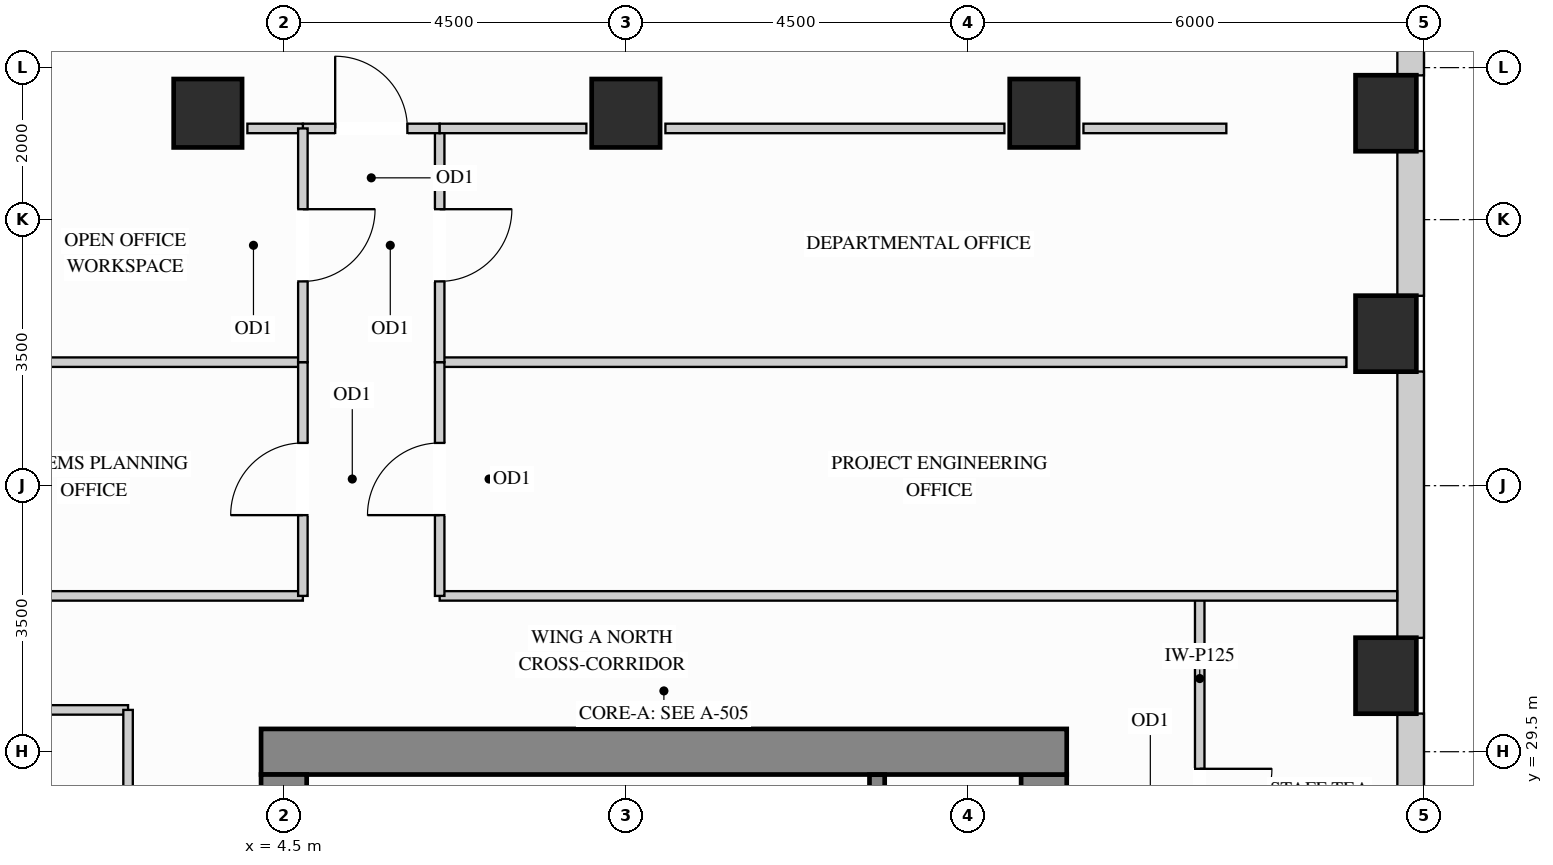
"""IFC4 building model, lengths in metres.
Left out: names, types, materials, properties, quantities, classifications, styles, units other than length and angle.
Written with IfcOpenShell. Run it as: python <this file> out.ifc"""

import sys

from ifc_helpers import new_model, si_unit, direction, frame, frame_2d, origin, origin_2d, place, context, subcontext, project, spatial, rectangle, extrude, source, transform, mapped, element, fill, save


model = new_model("IFC4")
c1 = context("Model", 3, precision=1e-05, world=origin(), true_north=direction((0.0, 1.0)))
c2 = subcontext(c1, "Body", "Model", "MODEL_VIEW")
j1 = project(units=[si_unit("LENGTHUNIT", "METRE"), si_unit("PLANEANGLEUNIT", "RADIAN")], contexts=[c1])
p1 = place(None, origin())
s1 = spatial("IfcSite", under=j1, at=p1, CompositionType="ELEMENT")
p2 = place(p1, origin())
s2 = spatial("IfcBuilding", under=s1, at=p2, CompositionType="ELEMENT")
p3 = place(p2, frame((0.0, 0.0, 189.9)))
s3 = spatial("IfcBuildingStorey", under=s2, at=p3, CompositionType="ELEMENT", Elevation=189.9)
m1 = source(origin(), c2, "Body", "SweptSolid", [
    extrude(rectangle(XDim=0.9, YDim=0.9, at=origin_2d()), origin(), (0.0, 0.0, 1.0), 3.4),
])
for number, where, z_axis, x_axis in (
    (1, (14.5, 37.9, 0.0), (0.0, 0.0, 1.0), (1.0, 0.0, 0.0)),
    (2, (3.5, 37.9, 0.0), (0.0, 0.0, 1.0), (1.0, 0.0, 0.0)),
    (3, (9.0, 37.9, 0.0), (0.0, 0.0, 1.0), (1.0, 0.0, 0.0)),
):
    element("IfcColumn", number, at=place(p3, frame(where, z_axis=z_axis, x_axis=x_axis)), inside=s3, PredefinedType="COLUMN", context=c2, shape_type="MappedRepresentation", body=[
        mapped(m1, transform((0.0, 0.0, 0.0), x_axis=(1.0, 0.0, 0.0), y_axis=(0.0, 1.0, 0.0), z_axis=(0.0, 0.0, 1.0))),
    ])
m2 = source(origin(), c2, "Body", "SweptSolid", [
    extrude(rectangle(XDim=0.8, YDim=1.0, at=origin_2d()), origin(), (0.0, 0.0, 1.0), 3.4),
])
for number, where, z_axis, x_axis in (
    (4, (19.0, 30.5, 0.0), (0.0, 0.0, 1.0), (1.0, 0.0, 0.0)),
    (5, (19.0, 35.0, 0.0), (0.0, 0.0, 1.0), (1.0, 0.0, 0.0)),
    (6, (19.0, 37.9, 0.0), (0.0, 0.0, 1.0), (1.0, 0.0, 0.0)),
):
    element("IfcColumn", number, at=place(p3, frame(where, z_axis=z_axis, x_axis=x_axis)), inside=s3, PredefinedType="COLUMN", context=c2, shape_type="MappedRepresentation", body=[
        mapped(m2, transform((0.0, 0.0, 0.0), x_axis=(1.0, 0.0, 0.0), y_axis=(0.0, 1.0, 0.0), z_axis=(0.0, 0.0, 1.0))),
    ])
m3 = source(origin(), c2, "Body", "SweptSolid", [
    extrude(rectangle(XDim=8.32, YDim=0.6, at=frame_2d((4.16, 0.0))), origin(), (0.0, 0.0, 1.0), 3.4),
])
p4 = place(p3, frame((14.5, 20.88, 0.0), z_axis=(0.0, 0.0, 1.0), x_axis=(0.0, 1.0, 0.0)))
e7 = element("IfcWall", 7, at=p4, inside=s3, PredefinedType="SHEAR", context=c2, shape_type="MappedRepresentation", body=[
    mapped(m3, transform((0.0, 0.0, 0.0), x_axis=(1.0, 0.0, 0.0), y_axis=(0.0, 1.0, 0.0), z_axis=(0.0, 0.0, 1.0))),
])
m4 = source(origin(), c2, "Body", "SweptSolid", [
    extrude(rectangle(XDim=10.6, YDim=0.6, at=frame_2d((5.3, 0.0))), origin(), (0.0, 0.0, 1.0), 3.4),
])
p5 = place(p3, frame((4.2, 29.5, 0.0), z_axis=(0.0, 0.0, 1.0), x_axis=(1.0, 0.0, 0.0)))
e8 = element("IfcWall", 8, at=p5, inside=s3, PredefinedType="SHEAR", context=c2, shape_type="MappedRepresentation", body=[
    mapped(m4, transform((0.0, 0.0, 0.0), x_axis=(1.0, 0.0, 0.0), y_axis=(0.0, 1.0, 0.0), z_axis=(0.0, 0.0, 1.0))),
])
m5 = source(origin(), c2, "Body", "SweptSolid", [
    extrude(rectangle(XDim=20.4, YDim=0.6, at=frame_2d((10.2, 0.0))), origin(), (0.0, 0.0, 1.0), 3.4),
])
p6 = place(p3, frame((4.5, 8.8, 0.0), z_axis=(0.0, 0.0, 1.0), x_axis=(0.0, 1.0, 0.0)))
e9 = element("IfcWall", 9, at=p6, inside=s3, PredefinedType="SHEAR", context=c2, shape_type="MappedRepresentation", body=[
    mapped(m5, transform((0.0, 0.0, 0.0), x_axis=(1.0, 0.0, 0.0), y_axis=(0.0, 1.0, 0.0), z_axis=(0.0, 0.0, 1.0))),
])
p7 = place(p3, frame((19.325, 27.298, 0.0), z_axis=(0.0, 0.0, 1.0), x_axis=(0.0, 1.0, 0.0)))
e10 = element("IfcWall", 10, at=p7, inside=s3, PredefinedType="SOLIDWALL", context=c2, shape_type="SweptSolid", body=[
    extrude(rectangle(XDim=2.704, YDim=0.35, at=frame_2d((1.352, 0.0))), origin(), (0.0, 0.0, 1.0), 2.612),
])
p8 = place(p7, frame((0.524, 0.0, 0.78)))
e11 = element("IfcOpeningElement", 11, at=p8, cuts=e10, PredefinedType="OPENING", context=c2, shape_type="SweptSolid", body=[
    extrude(rectangle(XDim=1.2, YDim=1.652, at=frame_2d((0.6, 0.826))), frame((0.0, 0.185, 0.0), z_axis=(0.0, -1.0, 0.0), x_axis=(1.0, 0.0, 0.0)), (0.0, 0.0, 1.0), 0.37),
])
m6 = source(origin(), c2, "Body", "SweptSolid", [
    extrude(rectangle(XDim=3.504, YDim=0.35, at=frame_2d((1.752, 0.0))), origin(), (0.0, 0.0, 1.0), 2.612),
])
p9 = place(p3, frame((19.325, 30.998, 0.0), z_axis=(0.0, 0.0, 1.0), x_axis=(0.0, 1.0, 0.0)))
e12 = element("IfcWall", 12, at=p9, inside=s3, PredefinedType="SOLIDWALL", context=c2, shape_type="MappedRepresentation", body=[
    mapped(m6, transform((0.0, 0.0, 0.0), x_axis=(1.0, 0.0, 0.0), y_axis=(0.0, 1.0, 0.0), z_axis=(0.0, 0.0, 1.0))),
])
m7 = source(origin(), c2, "Body", "SweptSolid", [
    extrude(rectangle(XDim=1.904, YDim=0.35, at=frame_2d((0.952, 0.0))), origin(), (0.0, 0.0, 1.0), 2.612),
])
p10 = place(p3, frame((19.325, 35.498, 0.0), z_axis=(0.0, 0.0, 1.0), x_axis=(0.0, 1.0, 0.0)))
e13 = element("IfcWall", 13, at=p10, inside=s3, PredefinedType="SOLIDWALL", context=c2, shape_type="MappedRepresentation", body=[
    mapped(m7, transform((0.0, 0.0, 0.0), x_axis=(1.0, 0.0, 0.0), y_axis=(0.0, 1.0, 0.0), z_axis=(0.0, 0.0, 1.0))),
])
m8 = source(origin(), c2, "Body", "SweptSolid", [
    extrude(rectangle(XDim=0.754, YDim=0.35, at=frame_2d((0.377, 0.0))), origin(), (0.0, 0.0, 1.0), 3.385),
])
p11 = place(p3, frame((19.325, 38.398, 0.0), z_axis=(0.0, 0.0, 1.0), x_axis=(0.0, 1.0, 0.0)))
e14 = element("IfcWall", 14, at=p11, inside=s3, PredefinedType="SOLIDWALL", context=c2, shape_type="MappedRepresentation", body=[
    mapped(m8, transform((0.0, 0.0, 0.0), x_axis=(1.0, 0.0, 0.0), y_axis=(0.0, 1.0, 0.0), z_axis=(0.0, 0.0, 1.0))),
])
p12 = place(p3, frame((16.55, 26.05, 0.0), z_axis=(0.0, 0.0, 1.0), x_axis=(0.0, 1.0, 0.0)))
e15 = element("IfcWall", 15, at=p12, inside=s3, PredefinedType="PARTITIONING", context=c2, shape_type="SweptSolid", body=[
    extrude(rectangle(XDim=5.5, YDim=0.125, at=frame_2d((2.75, 0.0))), origin(), (0.0, 0.0, 1.0), 3.385),
])
p13 = place(p12, frame((2.275, 0.0, 0.0)))
e16 = element("IfcOpeningElement", 16, at=p13, cuts=e15, PredefinedType="OPENING", context=c2, shape_type="SweptSolid", body=[
    extrude(rectangle(XDim=0.95, YDim=2.15, at=frame_2d((0.475, 1.075))), frame((0.0, 0.073, 0.0), z_axis=(0.0, -1.0, 0.0), x_axis=(1.0, 0.0, 0.0)), (0.0, 0.0, 1.0), 0.145),
])
m9 = source(origin(), c2, "Body", "SweptSolid", [
    extrude(rectangle(XDim=11.93, YDim=0.125, at=frame_2d((5.965, 0.0))), origin(), (0.0, 0.0, 1.0), 3.385),
])
p14 = place(p3, frame((6.55, 34.625, 0.0), z_axis=(0.0, 0.0, 1.0), x_axis=(1.0, 0.0, 0.0)))
e17 = element("IfcWall", 17, at=p14, inside=s3, PredefinedType="PARTITIONING", context=c2, shape_type="MappedRepresentation", body=[
    mapped(m9, transform((0.0, 0.0, 0.0), x_axis=(1.0, 0.0, 0.0), y_axis=(0.0, 1.0, 0.0), z_axis=(0.0, 0.0, 1.0))),
])
m10 = source(origin(), c2, "Body", "SweptSolid", [
    extrude(rectangle(XDim=12.598, YDim=0.125, at=frame_2d((6.299, 0.0))), origin(), (0.0, 0.0, 1.0), 3.385),
])
p15 = place(p3, frame((6.55, 31.55, 0.0), z_axis=(0.0, 0.0, 1.0), x_axis=(1.0, 0.0, 0.0)))
e18 = element("IfcWall", 18, at=p15, inside=s3, PredefinedType="PARTITIONING", context=c2, shape_type="MappedRepresentation", body=[
    mapped(m10, transform((0.0, 0.0, 0.0), x_axis=(1.0, 0.0, 0.0), y_axis=(0.0, 1.0, 0.0), z_axis=(0.0, 0.0, 1.0))),
])
m11 = source(origin(), c2, "Body", "SweptSolid", [
    extrude(rectangle(XDim=4.398, YDim=0.125, at=frame_2d((2.199, 0.0))), origin(), (0.0, 0.0, 1.0), 3.385),
])
p16 = place(p3, frame((0.352, 31.55, 0.0), z_axis=(0.0, 0.0, 1.0), x_axis=(1.0, 0.0, 0.0)))
e19 = element("IfcWall", 19, at=p16, inside=s3, PredefinedType="PARTITIONING", context=c2, shape_type="MappedRepresentation", body=[
    mapped(m11, transform((0.0, 0.0, 0.0), x_axis=(1.0, 0.0, 0.0), y_axis=(0.0, 1.0, 0.0), z_axis=(0.0, 0.0, 1.0))),
])
m12 = source(origin(), c2, "Body", "SweptSolid", [
    extrude(rectangle(XDim=3.63, YDim=0.125, at=frame_2d((1.815, 0.0))), origin(), (0.0, 0.0, 1.0), 3.385),
])
p17 = place(p3, frame((1.12, 34.625, 0.0), z_axis=(0.0, 0.0, 1.0), x_axis=(1.0, 0.0, 0.0)))
e20 = element("IfcWall", 20, at=p17, inside=s3, PredefinedType="PARTITIONING", context=c2, shape_type="MappedRepresentation", body=[
    mapped(m12, transform((0.0, 0.0, 0.0), x_axis=(1.0, 0.0, 0.0), y_axis=(0.0, 1.0, 0.0), z_axis=(0.0, 0.0, 1.0))),
])
m13 = source(origin(), c2, "Body", "SweptSolid", [
    extrude(rectangle(XDim=1.33, YDim=0.125, at=frame_2d((0.665, 0.0))), origin(), (0.0, 0.0, 1.0), 3.385),
])
p18 = place(p3, frame((1.12, 30.05, 0.0), z_axis=(0.0, 0.0, 1.0), x_axis=(1.0, 0.0, 0.0)))
e21 = element("IfcWall", 21, at=p18, inside=s3, PredefinedType="PARTITIONING", context=c2, shape_type="MappedRepresentation", body=[
    mapped(m13, transform((0.0, 0.0, 0.0), x_axis=(1.0, 0.0, 0.0), y_axis=(0.0, 1.0, 0.0), z_axis=(0.0, 0.0, 1.0))),
])
p19 = place(p3, frame((6.55, 31.55, 0.0), z_axis=(0.0, 0.0, 1.0), x_axis=(0.0, 1.0, 0.0)))
e22 = element("IfcWall", 22, at=p19, inside=s3, PredefinedType="PARTITIONING", context=c2, shape_type="SweptSolid", body=[
    extrude(rectangle(XDim=3.075, YDim=0.125, at=frame_2d((1.538, 0.0))), origin(), (0.0, 0.0, 1.0), 3.385),
])
p20 = place(p19, frame((1.062, 0.0, 0.0)))
e23 = element("IfcOpeningElement", 23, at=p20, cuts=e22, PredefinedType="OPENING", context=c2, shape_type="SweptSolid", body=[
    extrude(rectangle(XDim=0.95, YDim=2.15, at=frame_2d((0.475, 1.075))), frame((0.0, 0.073, 0.0), z_axis=(0.0, -1.0, 0.0), x_axis=(1.0, 0.0, 0.0)), (0.0, 0.0, 1.0), 0.145),
])
p21 = place(p3, frame((6.55, 34.625, 0.0), z_axis=(0.0, 0.0, 1.0), x_axis=(0.0, 1.0, 0.0)))
e24 = element("IfcWall", 24, at=p21, inside=s3, PredefinedType="PARTITIONING", context=c2, shape_type="SweptSolid", body=[
    extrude(rectangle(XDim=3.075, YDim=0.125, at=frame_2d((1.538, 0.0))), origin(), (0.0, 0.0, 1.0), 3.385),
])
p22 = place(p21, frame((1.062, 0.0, 0.0)))
e25 = element("IfcOpeningElement", 25, at=p22, cuts=e24, PredefinedType="OPENING", context=c2, shape_type="SweptSolid", body=[
    extrude(rectangle(XDim=0.95, YDim=2.15, at=frame_2d((0.475, 1.075))), frame((0.0, 0.073, 0.0), z_axis=(0.0, -1.0, 0.0), x_axis=(1.0, 0.0, 0.0)), (0.0, 0.0, 1.0), 0.145),
])
p23 = place(p3, frame((4.75, 37.7, 0.0), z_axis=(0.0, 0.0, 1.0), x_axis=(1.0, 0.0, 0.0)))
e26 = element("IfcWall", 26, at=p23, inside=s3, PredefinedType="PARTITIONING", context=c2, shape_type="SweptSolid", body=[
    extrude(rectangle(XDim=1.8, YDim=0.125, at=frame_2d((0.9, 0.0))), origin(), (0.0, 0.0, 1.0), 2.773),
])
p24 = place(p23, frame((0.425, 0.0, 0.0)))
e27 = element("IfcOpeningElement", 27, at=p24, cuts=e26, PredefinedType="OPENING", context=c2, shape_type="SweptSolid", body=[
    extrude(rectangle(XDim=0.95, YDim=2.15, at=frame_2d((0.475, 1.075))), frame((0.0, 0.073, 0.0), z_axis=(0.0, -1.0, 0.0), x_axis=(1.0, 0.0, 0.0)), (0.0, 0.0, 1.0), 0.145),
])
m14 = source(origin(), c2, "Body", "SweptSolid", [
    extrude(rectangle(XDim=1.93, YDim=0.125, at=frame_2d((0.965, 0.0))), origin(), (0.0, 0.0, 1.0), 2.773),
])
p25 = place(p3, frame((6.55, 37.7, 0.0), z_axis=(0.0, 0.0, 1.0), x_axis=(1.0, 0.0, 0.0)))
e28 = element("IfcWall", 28, at=p25, inside=s3, PredefinedType="PARTITIONING", context=c2, shape_type="MappedRepresentation", body=[
    mapped(m14, transform((0.0, 0.0, 0.0), x_axis=(1.0, 0.0, 0.0), y_axis=(0.0, 1.0, 0.0), z_axis=(0.0, 0.0, 1.0))),
])
m15 = source(origin(), c2, "Body", "SweptSolid", [
    extrude(rectangle(XDim=4.46, YDim=0.125, at=frame_2d((2.23, 0.0))), origin(), (0.0, 0.0, 1.0), 2.773),
])
p26 = place(p3, frame((9.52, 37.7, 0.0), z_axis=(0.0, 0.0, 1.0), x_axis=(1.0, 0.0, 0.0)))
e29 = element("IfcWall", 29, at=p26, inside=s3, PredefinedType="PARTITIONING", context=c2, shape_type="MappedRepresentation", body=[
    mapped(m15, transform((0.0, 0.0, 0.0), x_axis=(1.0, 0.0, 0.0), y_axis=(0.0, 1.0, 0.0), z_axis=(0.0, 0.0, 1.0))),
])
m16 = source(origin(), c2, "Body", "SweptSolid", [
    extrude(rectangle(XDim=1.88, YDim=0.125, at=frame_2d((0.94, 0.0))), origin(), (0.0, 0.0, 1.0), 2.773),
])
p27 = place(p3, frame((15.02, 37.7, 0.0), z_axis=(0.0, 0.0, 1.0), x_axis=(1.0, 0.0, 0.0)))
e30 = element("IfcWall", 30, at=p27, inside=s3, PredefinedType="PARTITIONING", context=c2, shape_type="MappedRepresentation", body=[
    mapped(m16, transform((0.0, 0.0, 0.0), x_axis=(1.0, 0.0, 0.0), y_axis=(0.0, 1.0, 0.0), z_axis=(0.0, 0.0, 1.0))),
])
m17 = source(origin(), c2, "Body", "SweptSolid", [
    extrude(rectangle(XDim=0.73, YDim=0.125, at=frame_2d((0.365, 0.0))), origin(), (0.0, 0.0, 1.0), 2.773),
])
p28 = place(p3, frame((4.02, 37.7, 0.0), z_axis=(0.0, 0.0, 1.0), x_axis=(1.0, 0.0, 0.0)))
e31 = element("IfcWall", 31, at=p28, inside=s3, PredefinedType="PARTITIONING", context=c2, shape_type="MappedRepresentation", body=[
    mapped(m17, transform((0.0, 0.0, 0.0), x_axis=(1.0, 0.0, 0.0), y_axis=(0.0, 1.0, 0.0), z_axis=(0.0, 0.0, 1.0))),
])
p29 = place(p3, frame((4.75, 31.55, 0.0), z_axis=(0.0, 0.0, 1.0), x_axis=(0.0, 1.0, 0.0)))
e32 = element("IfcWall", 32, at=p29, inside=s3, PredefinedType="PARTITIONING", context=c2, shape_type="SweptSolid", body=[
    extrude(rectangle(XDim=3.075, YDim=0.125, at=frame_2d((1.538, 0.0))), origin(), (0.0, 0.0, 1.0), 3.385),
])
p30 = place(p29, frame((1.062, 0.0, 0.0)))
e33 = element("IfcOpeningElement", 33, at=p30, cuts=e32, PredefinedType="OPENING", context=c2, shape_type="SweptSolid", body=[
    extrude(rectangle(XDim=0.95, YDim=2.15, at=frame_2d((0.475, 1.075))), frame((0.0, 0.073, 0.0), z_axis=(0.0, -1.0, 0.0), x_axis=(1.0, 0.0, 0.0)), (0.0, 0.0, 1.0), 0.145),
])
p31 = place(p3, frame((4.75, 34.625, 0.0), z_axis=(0.0, 0.0, 1.0), x_axis=(0.0, 1.0, 0.0)))
e34 = element("IfcWall", 34, at=p31, inside=s3, PredefinedType="PARTITIONING", context=c2, shape_type="SweptSolid", body=[
    extrude(rectangle(XDim=3.075, YDim=0.125, at=frame_2d((1.538, 0.0))), origin(), (0.0, 0.0, 1.0), 3.385),
])
p32 = place(p31, frame((1.062, 0.0, 0.0)))
e35 = element("IfcOpeningElement", 35, at=p32, cuts=e34, PredefinedType="OPENING", context=c2, shape_type="SweptSolid", body=[
    extrude(rectangle(XDim=0.95, YDim=2.15, at=frame_2d((0.475, 1.075))), frame((0.0, 0.073, 0.0), z_axis=(0.0, -1.0, 0.0), x_axis=(1.0, 0.0, 0.0)), (0.0, 0.0, 1.0), 0.145),
])
p33 = place(p3, frame((2.45, 22.6, 0.0), z_axis=(0.0, 0.0, 1.0), x_axis=(0.0, 1.0, 0.0)))
e36 = element("IfcWall", 36, at=p33, inside=s3, PredefinedType="PARTITIONING", context=c2, shape_type="SweptSolid", body=[
    extrude(rectangle(XDim=7.45, YDim=0.125, at=frame_2d((3.725, 0.0))), origin(), (0.0, 0.0, 1.0), 3.385),
])
p34 = place(p33, frame((3.25, 0.0, 0.0)))
e37 = element("IfcOpeningElement", 37, at=p34, cuts=e36, PredefinedType="OPENING", context=c2, shape_type="SweptSolid", body=[
    extrude(rectangle(XDim=0.95, YDim=2.15, at=frame_2d((0.475, 1.075))), frame((0.0, 0.073, 0.0), z_axis=(0.0, -1.0, 0.0), x_axis=(1.0, 0.0, 0.0)), (0.0, 0.0, 1.0), 0.145),
])
m18 = source(origin(), c2, "Body", "SweptSolid", [
    extrude(rectangle(XDim=3.753, YDim=0.2, at=frame_2d((1.876, 0.0))), origin(), (0.0, 0.0, 1.0), 3.4),
])
p35 = place(p3, frame((12.305, 25.445, 0.0), z_axis=(0.0, 0.0, 1.0), x_axis=(0.0, 1.0, 0.0)))
e38 = element("IfcWall", 38, at=p35, inside=s3, PredefinedType="SHEAR", context=c2, shape_type="MappedRepresentation", body=[
    mapped(m18, transform((0.0, 0.0, 0.0), x_axis=(1.0, 0.0, 0.0), y_axis=(0.0, 1.0, 0.0), z_axis=(0.0, 0.0, 1.0))),
])
m19 = source(origin(), c2, "Body", "SweptSolid", [
    extrude(rectangle(XDim=0.95, YDim=2.15, at=frame_2d((0.475, 1.075))), frame((0.0, 0.025, 0.0), z_axis=(0.0, -1.0, 0.0), x_axis=(1.0, 0.0, 0.0)), (0.0, 0.0, 1.0), 0.05),
])
p36 = place(p13, origin())
e39 = element("IfcDoor", 39, at=p36, inside=s3, OperationType="SINGLE_SWING_RIGHT", PredefinedType="DOOR", context=c2, shape_type="MappedRepresentation", body=[
    mapped(m19, transform((0.0, 0.0, 0.0), x_axis=(1.0, 0.0, 0.0), y_axis=(0.0, 1.0, 0.0), z_axis=(0.0, 0.0, 1.0))),
])
fill(e16, e39)
p37 = place(p20, origin())
e40 = element("IfcDoor", 40, at=p37, inside=s3, OperationType="SINGLE_SWING_LEFT", PredefinedType="DOOR", context=c2, shape_type="MappedRepresentation", body=[
    mapped(m19, transform((0.0, 0.0, 0.0), x_axis=(1.0, 0.0, 0.0), y_axis=(0.0, 1.0, 0.0), z_axis=(0.0, 0.0, 1.0))),
])
fill(e23, e40)
p38 = place(p22, origin())
e41 = element("IfcDoor", 41, at=p38, inside=s3, OperationType="SINGLE_SWING_RIGHT", PredefinedType="DOOR", context=c2, shape_type="MappedRepresentation", body=[
    mapped(m19, transform((0.0, 0.0, 0.0), x_axis=(1.0, 0.0, 0.0), y_axis=(0.0, 1.0, 0.0), z_axis=(0.0, 0.0, 1.0))),
])
fill(e25, e41)
p39 = place(p24, origin())
e42 = element("IfcDoor", 42, at=p39, inside=s3, OperationType="SINGLE_SWING_LEFT", PredefinedType="DOOR", context=c2, shape_type="MappedRepresentation", body=[
    mapped(m19, transform((0.0, 0.0, 0.0), x_axis=(1.0, 0.0, 0.0), y_axis=(0.0, 1.0, 0.0), z_axis=(0.0, 0.0, 1.0))),
])
fill(e27, e42)
p40 = place(p30, origin())
e43 = element("IfcDoor", 43, at=p40, inside=s3, OperationType="SINGLE_SWING_LEFT", PredefinedType="DOOR", context=c2, shape_type="MappedRepresentation", body=[
    mapped(m19, transform((0.0, 0.0, 0.0), x_axis=(1.0, 0.0, 0.0), y_axis=(0.0, 1.0, 0.0), z_axis=(0.0, 0.0, 1.0))),
])
fill(e33, e43)
p41 = place(p32, origin())
e44 = element("IfcDoor", 44, at=p41, inside=s3, OperationType="SINGLE_SWING_RIGHT", PredefinedType="DOOR", context=c2, shape_type="MappedRepresentation", body=[
    mapped(m19, transform((0.0, 0.0, 0.0), x_axis=(1.0, 0.0, 0.0), y_axis=(0.0, 1.0, 0.0), z_axis=(0.0, 0.0, 1.0))),
])
fill(e35, e44)
save(model, sys.argv[1])
